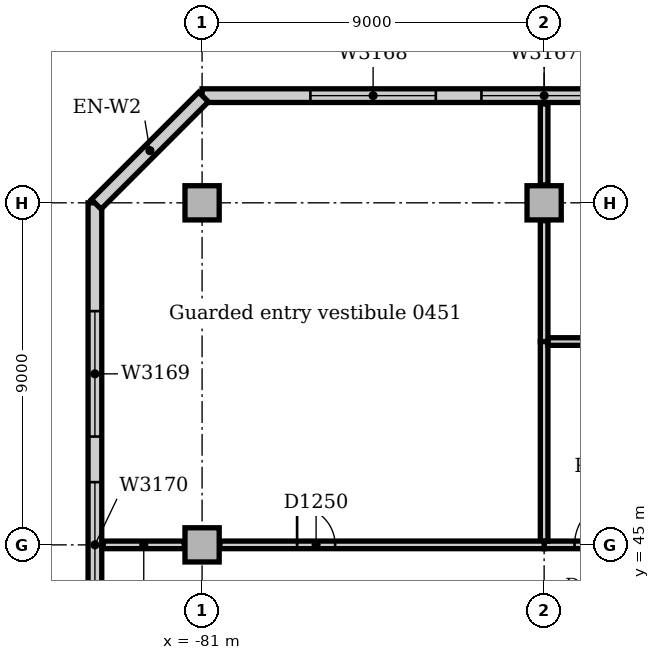
"""IFC4 building model, lengths in metres.
Left out: names, types, materials, properties, quantities, classifications, styles, units other than length and angle.
Written with IfcOpenShell. Run it as: python <this file> out.ifc"""

import sys

from ifc_helpers import new_model, si_unit, direction, frame, frame_2d, origin, origin_2d, place, context, subcontext, project, spatial, rectangle, extrude, element, fill, save


model = new_model("IFC4")
c1 = context("Model", 3, precision=1e-05, world=origin(), true_north=direction((0.0, 1.0)))
c2 = subcontext(c1, "Body", "Model", "MODEL_VIEW")
j1 = project(units=[si_unit("LENGTHUNIT", "METRE"), si_unit("PLANEANGLEUNIT", "RADIAN")], contexts=[c1])
p1 = place(None, origin())
s1 = spatial("IfcSite", under=j1, at=p1, CompositionType="ELEMENT")
p2 = place(p1, origin())
s2 = spatial("IfcBuilding", under=s1, at=p2, CompositionType="ELEMENT")
p3 = place(p2, frame((0.0, 0.0, 21.0)))
s3 = spatial("IfcBuildingStorey", under=s2, at=p3, CompositionType="ELEMENT", Elevation=21.0)
for number, where, z_axis, x_axis in (
    (1, (-81.0, 45.0, 0.0), (0.0, 0.0, 1.0), (1.0, 0.0, 0.0)),
    (2, (-81.0, 54.0, 0.0), (0.0, 0.0, 1.0), (1.0, 0.0, 0.0)),
    (3, (-72.0, 54.0, 0.0), (0.0, 0.0, 1.0), (1.0, 0.0, 0.0)),
):
    element("IfcColumn", number, at=place(p3, frame(where, z_axis=z_axis, x_axis=x_axis)), inside=s3, PredefinedType="COLUMN", context=c2, shape_type="SweptSolid", body=[
        extrude(rectangle(XDim=0.9, YDim=0.9, at=origin_2d()), origin(), (0.0, 0.0, 1.0), 4.7),
    ])
p4 = place(p3, frame((63.0, 56.82, 0.0), z_axis=(0.0, 0.0, 1.0), x_axis=(-1.0, 0.0, 0.0)))
e4 = element("IfcWall", 4, at=p4, inside=s3, PredefinedType="STANDARD", context=c2, shape_type="SweptSolid", body=[
    extrude(rectangle(XDim=144.0, YDim=0.36, at=frame_2d((72.0, 0.0))), origin(), (0.0, 0.0, 1.0), 4.85),
])
p5 = place(p4, frame((2.85, 0.0, 0.9)))
e5 = element("IfcOpeningElement", 5, at=p5, cuts=e4, PredefinedType="OPENING", context=c2, shape_type="SweptSolid", body=[
    extrude(rectangle(XDim=3.3, YDim=2.4, at=frame_2d((1.65, 1.2))), frame((0.0, 0.19, 0.0), z_axis=(0.0, -1.0, 0.0), x_axis=(1.0, 0.0, 0.0)), (0.0, 0.0, 1.0), 0.38),
])
p6 = place(p4, frame((7.35, 0.0, 0.9)))
e6 = element("IfcOpeningElement", 6, at=p6, cuts=e4, PredefinedType="OPENING", context=c2, shape_type="SweptSolid", body=[
    extrude(rectangle(XDim=3.3, YDim=2.4, at=frame_2d((1.65, 1.2))), frame((0.0, 0.19, 0.0), z_axis=(0.0, -1.0, 0.0), x_axis=(1.0, 0.0, 0.0)), (0.0, 0.0, 1.0), 0.38),
])
p7 = place(p4, frame((11.85, 0.0, 0.9)))
e7 = element("IfcOpeningElement", 7, at=p7, cuts=e4, PredefinedType="OPENING", context=c2, shape_type="SweptSolid", body=[
    extrude(rectangle(XDim=3.3, YDim=2.4, at=frame_2d((1.65, 1.2))), frame((0.0, 0.19, 0.0), z_axis=(0.0, -1.0, 0.0), x_axis=(1.0, 0.0, 0.0)), (0.0, 0.0, 1.0), 0.38),
])
p8 = place(p4, frame((16.35, 0.0, 0.9)))
e8 = element("IfcOpeningElement", 8, at=p8, cuts=e4, PredefinedType="OPENING", context=c2, shape_type="SweptSolid", body=[
    extrude(rectangle(XDim=3.3, YDim=2.4, at=frame_2d((1.65, 1.2))), frame((0.0, 0.19, 0.0), z_axis=(0.0, -1.0, 0.0), x_axis=(1.0, 0.0, 0.0)), (0.0, 0.0, 1.0), 0.38),
])
p9 = place(p4, frame((20.85, 0.0, 0.9)))
e9 = element("IfcOpeningElement", 9, at=p9, cuts=e4, PredefinedType="OPENING", context=c2, shape_type="SweptSolid", body=[
    extrude(rectangle(XDim=3.3, YDim=2.4, at=frame_2d((1.65, 1.2))), frame((0.0, 0.19, 0.0), z_axis=(0.0, -1.0, 0.0), x_axis=(1.0, 0.0, 0.0)), (0.0, 0.0, 1.0), 0.38),
])
p10 = place(p4, frame((25.35, 0.0, 0.9)))
e10 = element("IfcOpeningElement", 10, at=p10, cuts=e4, PredefinedType="OPENING", context=c2, shape_type="SweptSolid", body=[
    extrude(rectangle(XDim=3.3, YDim=2.4, at=frame_2d((1.65, 1.2))), frame((0.0, 0.19, 0.0), z_axis=(0.0, -1.0, 0.0), x_axis=(1.0, 0.0, 0.0)), (0.0, 0.0, 1.0), 0.38),
])
p11 = place(p4, frame((29.85, 0.0, 0.9)))
e11 = element("IfcOpeningElement", 11, at=p11, cuts=e4, PredefinedType="OPENING", context=c2, shape_type="SweptSolid", body=[
    extrude(rectangle(XDim=3.3, YDim=2.4, at=frame_2d((1.65, 1.2))), frame((0.0, 0.19, 0.0), z_axis=(0.0, -1.0, 0.0), x_axis=(1.0, 0.0, 0.0)), (0.0, 0.0, 1.0), 0.38),
])
p12 = place(p4, frame((34.35, 0.0, 0.9)))
e12 = element("IfcOpeningElement", 12, at=p12, cuts=e4, PredefinedType="OPENING", context=c2, shape_type="SweptSolid", body=[
    extrude(rectangle(XDim=3.3, YDim=2.4, at=frame_2d((1.65, 1.2))), frame((0.0, 0.19, 0.0), z_axis=(0.0, -1.0, 0.0), x_axis=(1.0, 0.0, 0.0)), (0.0, 0.0, 1.0), 0.38),
])
p13 = place(p4, frame((38.85, 0.0, 0.9)))
e13 = element("IfcOpeningElement", 13, at=p13, cuts=e4, PredefinedType="OPENING", context=c2, shape_type="SweptSolid", body=[
    extrude(rectangle(XDim=3.3, YDim=2.4, at=frame_2d((1.65, 1.2))), frame((0.0, 0.19, 0.0), z_axis=(0.0, -1.0, 0.0), x_axis=(1.0, 0.0, 0.0)), (0.0, 0.0, 1.0), 0.38),
])
p14 = place(p4, frame((43.35, 0.0, 0.9)))
e14 = element("IfcOpeningElement", 14, at=p14, cuts=e4, PredefinedType="OPENING", context=c2, shape_type="SweptSolid", body=[
    extrude(rectangle(XDim=3.3, YDim=2.4, at=frame_2d((1.65, 1.2))), frame((0.0, 0.19, 0.0), z_axis=(0.0, -1.0, 0.0), x_axis=(1.0, 0.0, 0.0)), (0.0, 0.0, 1.0), 0.38),
])
p15 = place(p4, frame((47.85, 0.0, 0.9)))
e15 = element("IfcOpeningElement", 15, at=p15, cuts=e4, PredefinedType="OPENING", context=c2, shape_type="SweptSolid", body=[
    extrude(rectangle(XDim=3.3, YDim=2.4, at=frame_2d((1.65, 1.2))), frame((0.0, 0.19, 0.0), z_axis=(0.0, -1.0, 0.0), x_axis=(1.0, 0.0, 0.0)), (0.0, 0.0, 1.0), 0.38),
])
p16 = place(p4, frame((52.35, 0.0, 0.9)))
e16 = element("IfcOpeningElement", 16, at=p16, cuts=e4, PredefinedType="OPENING", context=c2, shape_type="SweptSolid", body=[
    extrude(rectangle(XDim=3.3, YDim=2.4, at=frame_2d((1.65, 1.2))), frame((0.0, 0.19, 0.0), z_axis=(0.0, -1.0, 0.0), x_axis=(1.0, 0.0, 0.0)), (0.0, 0.0, 1.0), 0.38),
])
p17 = place(p4, frame((56.85, 0.0, 0.9)))
e17 = element("IfcOpeningElement", 17, at=p17, cuts=e4, PredefinedType="OPENING", context=c2, shape_type="SweptSolid", body=[
    extrude(rectangle(XDim=3.3, YDim=2.4, at=frame_2d((1.65, 1.2))), frame((0.0, 0.19, 0.0), z_axis=(0.0, -1.0, 0.0), x_axis=(1.0, 0.0, 0.0)), (0.0, 0.0, 1.0), 0.38),
])
p18 = place(p4, frame((61.35, 0.0, 0.9)))
e18 = element("IfcOpeningElement", 18, at=p18, cuts=e4, PredefinedType="OPENING", context=c2, shape_type="SweptSolid", body=[
    extrude(rectangle(XDim=3.3, YDim=2.4, at=frame_2d((1.65, 1.2))), frame((0.0, 0.19, 0.0), z_axis=(0.0, -1.0, 0.0), x_axis=(1.0, 0.0, 0.0)), (0.0, 0.0, 1.0), 0.38),
])
p19 = place(p4, frame((65.85, 0.0, 0.9)))
e19 = element("IfcOpeningElement", 19, at=p19, cuts=e4, PredefinedType="OPENING", context=c2, shape_type="SweptSolid", body=[
    extrude(rectangle(XDim=3.3, YDim=2.4, at=frame_2d((1.65, 1.2))), frame((0.0, 0.19, 0.0), z_axis=(0.0, -1.0, 0.0), x_axis=(1.0, 0.0, 0.0)), (0.0, 0.0, 1.0), 0.38),
])
p20 = place(p4, frame((70.35, 0.0, 0.9)))
e20 = element("IfcOpeningElement", 20, at=p20, cuts=e4, PredefinedType="OPENING", context=c2, shape_type="SweptSolid", body=[
    extrude(rectangle(XDim=3.3, YDim=2.4, at=frame_2d((1.65, 1.2))), frame((0.0, 0.19, 0.0), z_axis=(0.0, -1.0, 0.0), x_axis=(1.0, 0.0, 0.0)), (0.0, 0.0, 1.0), 0.38),
])
p21 = place(p4, frame((74.85, 0.0, 0.9)))
e21 = element("IfcOpeningElement", 21, at=p21, cuts=e4, PredefinedType="OPENING", context=c2, shape_type="SweptSolid", body=[
    extrude(rectangle(XDim=3.3, YDim=2.4, at=frame_2d((1.65, 1.2))), frame((0.0, 0.19, 0.0), z_axis=(0.0, -1.0, 0.0), x_axis=(1.0, 0.0, 0.0)), (0.0, 0.0, 1.0), 0.38),
])
p22 = place(p4, frame((79.35, 0.0, 0.9)))
e22 = element("IfcOpeningElement", 22, at=p22, cuts=e4, PredefinedType="OPENING", context=c2, shape_type="SweptSolid", body=[
    extrude(rectangle(XDim=3.3, YDim=2.4, at=frame_2d((1.65, 1.2))), frame((0.0, 0.19, 0.0), z_axis=(0.0, -1.0, 0.0), x_axis=(1.0, 0.0, 0.0)), (0.0, 0.0, 1.0), 0.38),
])
p23 = place(p4, frame((83.85, 0.0, 0.9)))
e23 = element("IfcOpeningElement", 23, at=p23, cuts=e4, PredefinedType="OPENING", context=c2, shape_type="SweptSolid", body=[
    extrude(rectangle(XDim=3.3, YDim=2.4, at=frame_2d((1.65, 1.2))), frame((0.0, 0.19, 0.0), z_axis=(0.0, -1.0, 0.0), x_axis=(1.0, 0.0, 0.0)), (0.0, 0.0, 1.0), 0.38),
])
p24 = place(p4, frame((88.35, 0.0, 0.9)))
e24 = element("IfcOpeningElement", 24, at=p24, cuts=e4, PredefinedType="OPENING", context=c2, shape_type="SweptSolid", body=[
    extrude(rectangle(XDim=3.3, YDim=2.4, at=frame_2d((1.65, 1.2))), frame((0.0, 0.19, 0.0), z_axis=(0.0, -1.0, 0.0), x_axis=(1.0, 0.0, 0.0)), (0.0, 0.0, 1.0), 0.38),
])
p25 = place(p4, frame((92.85, 0.0, 0.9)))
e25 = element("IfcOpeningElement", 25, at=p25, cuts=e4, PredefinedType="OPENING", context=c2, shape_type="SweptSolid", body=[
    extrude(rectangle(XDim=3.3, YDim=2.4, at=frame_2d((1.65, 1.2))), frame((0.0, 0.19, 0.0), z_axis=(0.0, -1.0, 0.0), x_axis=(1.0, 0.0, 0.0)), (0.0, 0.0, 1.0), 0.38),
])
p26 = place(p4, frame((97.35, 0.0, 0.9)))
e26 = element("IfcOpeningElement", 26, at=p26, cuts=e4, PredefinedType="OPENING", context=c2, shape_type="SweptSolid", body=[
    extrude(rectangle(XDim=3.3, YDim=2.4, at=frame_2d((1.65, 1.2))), frame((0.0, 0.19, 0.0), z_axis=(0.0, -1.0, 0.0), x_axis=(1.0, 0.0, 0.0)), (0.0, 0.0, 1.0), 0.38),
])
p27 = place(p4, frame((101.85, 0.0, 0.9)))
e27 = element("IfcOpeningElement", 27, at=p27, cuts=e4, PredefinedType="OPENING", context=c2, shape_type="SweptSolid", body=[
    extrude(rectangle(XDim=3.3, YDim=2.4, at=frame_2d((1.65, 1.2))), frame((0.0, 0.19, 0.0), z_axis=(0.0, -1.0, 0.0), x_axis=(1.0, 0.0, 0.0)), (0.0, 0.0, 1.0), 0.38),
])
p28 = place(p4, frame((106.35, 0.0, 0.9)))
e28 = element("IfcOpeningElement", 28, at=p28, cuts=e4, PredefinedType="OPENING", context=c2, shape_type="SweptSolid", body=[
    extrude(rectangle(XDim=3.3, YDim=2.4, at=frame_2d((1.65, 1.2))), frame((0.0, 0.19, 0.0), z_axis=(0.0, -1.0, 0.0), x_axis=(1.0, 0.0, 0.0)), (0.0, 0.0, 1.0), 0.38),
])
p29 = place(p4, frame((110.85, 0.0, 0.9)))
e29 = element("IfcOpeningElement", 29, at=p29, cuts=e4, PredefinedType="OPENING", context=c2, shape_type="SweptSolid", body=[
    extrude(rectangle(XDim=3.3, YDim=2.4, at=frame_2d((1.65, 1.2))), frame((0.0, 0.19, 0.0), z_axis=(0.0, -1.0, 0.0), x_axis=(1.0, 0.0, 0.0)), (0.0, 0.0, 1.0), 0.38),
])
p30 = place(p4, frame((115.35, 0.0, 0.9)))
e30 = element("IfcOpeningElement", 30, at=p30, cuts=e4, PredefinedType="OPENING", context=c2, shape_type="SweptSolid", body=[
    extrude(rectangle(XDim=3.3, YDim=2.4, at=frame_2d((1.65, 1.2))), frame((0.0, 0.19, 0.0), z_axis=(0.0, -1.0, 0.0), x_axis=(1.0, 0.0, 0.0)), (0.0, 0.0, 1.0), 0.38),
])
p31 = place(p4, frame((119.85, 0.0, 0.9)))
e31 = element("IfcOpeningElement", 31, at=p31, cuts=e4, PredefinedType="OPENING", context=c2, shape_type="SweptSolid", body=[
    extrude(rectangle(XDim=3.3, YDim=2.4, at=frame_2d((1.65, 1.2))), frame((0.0, 0.19, 0.0), z_axis=(0.0, -1.0, 0.0), x_axis=(1.0, 0.0, 0.0)), (0.0, 0.0, 1.0), 0.38),
])
p32 = place(p4, frame((124.35, 0.0, 0.9)))
e32 = element("IfcOpeningElement", 32, at=p32, cuts=e4, PredefinedType="OPENING", context=c2, shape_type="SweptSolid", body=[
    extrude(rectangle(XDim=3.3, YDim=2.4, at=frame_2d((1.65, 1.2))), frame((0.0, 0.19, 0.0), z_axis=(0.0, -1.0, 0.0), x_axis=(1.0, 0.0, 0.0)), (0.0, 0.0, 1.0), 0.38),
])
p33 = place(p4, frame((128.85, 0.0, 0.9)))
e33 = element("IfcOpeningElement", 33, at=p33, cuts=e4, PredefinedType="OPENING", context=c2, shape_type="SweptSolid", body=[
    extrude(rectangle(XDim=3.3, YDim=2.4, at=frame_2d((1.65, 1.2))), frame((0.0, 0.19, 0.0), z_axis=(0.0, -1.0, 0.0), x_axis=(1.0, 0.0, 0.0)), (0.0, 0.0, 1.0), 0.38),
])
p34 = place(p4, frame((133.35, 0.0, 0.9)))
e34 = element("IfcOpeningElement", 34, at=p34, cuts=e4, PredefinedType="OPENING", context=c2, shape_type="SweptSolid", body=[
    extrude(rectangle(XDim=3.3, YDim=2.4, at=frame_2d((1.65, 1.2))), frame((0.0, 0.19, 0.0), z_axis=(0.0, -1.0, 0.0), x_axis=(1.0, 0.0, 0.0)), (0.0, 0.0, 1.0), 0.38),
])
p35 = place(p4, frame((137.85, 0.0, 0.9)))
e35 = element("IfcOpeningElement", 35, at=p35, cuts=e4, PredefinedType="OPENING", context=c2, shape_type="SweptSolid", body=[
    extrude(rectangle(XDim=3.3, YDim=2.4, at=frame_2d((1.65, 1.2))), frame((0.0, 0.19, 0.0), z_axis=(0.0, -1.0, 0.0), x_axis=(1.0, 0.0, 0.0)), (0.0, 0.0, 1.0), 0.38),
])
p36 = place(p3, frame((-83.82, 54.0, 0.0), z_axis=(0.0, 0.0, 1.0), x_axis=(0.0, -1.0, 0.0)))
e36 = element("IfcWall", 36, at=p36, inside=s3, PredefinedType="STANDARD", context=c2, shape_type="SweptSolid", body=[
    extrude(rectangle(XDim=63.0, YDim=0.36, at=frame_2d((31.5, 0.0))), origin(), (0.0, 0.0, 1.0), 4.85),
])
p37 = place(p36, frame((2.85, 0.0, 0.9)))
e37 = element("IfcOpeningElement", 37, at=p37, cuts=e36, PredefinedType="OPENING", context=c2, shape_type="SweptSolid", body=[
    extrude(rectangle(XDim=3.3, YDim=2.4, at=frame_2d((1.65, 1.2))), frame((0.0, 0.19, 0.0), z_axis=(0.0, -1.0, 0.0), x_axis=(1.0, 0.0, 0.0)), (0.0, 0.0, 1.0), 0.38),
])
p38 = place(p36, frame((7.35, 0.0, 0.9)))
e38 = element("IfcOpeningElement", 38, at=p38, cuts=e36, PredefinedType="OPENING", context=c2, shape_type="SweptSolid", body=[
    extrude(rectangle(XDim=3.3, YDim=2.4, at=frame_2d((1.65, 1.2))), frame((0.0, 0.19, 0.0), z_axis=(0.0, -1.0, 0.0), x_axis=(1.0, 0.0, 0.0)), (0.0, 0.0, 1.0), 0.38),
])
p39 = place(p36, frame((11.85, 0.0, 0.9)))
e39 = element("IfcOpeningElement", 39, at=p39, cuts=e36, PredefinedType="OPENING", context=c2, shape_type="SweptSolid", body=[
    extrude(rectangle(XDim=3.3, YDim=2.4, at=frame_2d((1.65, 1.2))), frame((0.0, 0.19, 0.0), z_axis=(0.0, -1.0, 0.0), x_axis=(1.0, 0.0, 0.0)), (0.0, 0.0, 1.0), 0.38),
])
p40 = place(p36, frame((16.35, 0.0, 0.9)))
e40 = element("IfcOpeningElement", 40, at=p40, cuts=e36, PredefinedType="OPENING", context=c2, shape_type="SweptSolid", body=[
    extrude(rectangle(XDim=3.3, YDim=2.4, at=frame_2d((1.65, 1.2))), frame((0.0, 0.19, 0.0), z_axis=(0.0, -1.0, 0.0), x_axis=(1.0, 0.0, 0.0)), (0.0, 0.0, 1.0), 0.38),
])
p41 = place(p36, frame((20.85, 0.0, 0.9)))
e41 = element("IfcOpeningElement", 41, at=p41, cuts=e36, PredefinedType="OPENING", context=c2, shape_type="SweptSolid", body=[
    extrude(rectangle(XDim=3.3, YDim=2.4, at=frame_2d((1.65, 1.2))), frame((0.0, 0.19, 0.0), z_axis=(0.0, -1.0, 0.0), x_axis=(1.0, 0.0, 0.0)), (0.0, 0.0, 1.0), 0.38),
])
p42 = place(p36, frame((25.35, 0.0, 0.9)))
e42 = element("IfcOpeningElement", 42, at=p42, cuts=e36, PredefinedType="OPENING", context=c2, shape_type="SweptSolid", body=[
    extrude(rectangle(XDim=3.3, YDim=2.4, at=frame_2d((1.65, 1.2))), frame((0.0, 0.19, 0.0), z_axis=(0.0, -1.0, 0.0), x_axis=(1.0, 0.0, 0.0)), (0.0, 0.0, 1.0), 0.38),
])
p43 = place(p36, frame((29.85, 0.0, 0.9)))
e43 = element("IfcOpeningElement", 43, at=p43, cuts=e36, PredefinedType="OPENING", context=c2, shape_type="SweptSolid", body=[
    extrude(rectangle(XDim=3.3, YDim=2.4, at=frame_2d((1.65, 1.2))), frame((0.0, 0.19, 0.0), z_axis=(0.0, -1.0, 0.0), x_axis=(1.0, 0.0, 0.0)), (0.0, 0.0, 1.0), 0.38),
])
p44 = place(p36, frame((34.35, 0.0, 0.9)))
e44 = element("IfcOpeningElement", 44, at=p44, cuts=e36, PredefinedType="OPENING", context=c2, shape_type="SweptSolid", body=[
    extrude(rectangle(XDim=3.3, YDim=2.4, at=frame_2d((1.65, 1.2))), frame((0.0, 0.19, 0.0), z_axis=(0.0, -1.0, 0.0), x_axis=(1.0, 0.0, 0.0)), (0.0, 0.0, 1.0), 0.38),
])
p45 = place(p36, frame((38.85, 0.0, 0.9)))
e45 = element("IfcOpeningElement", 45, at=p45, cuts=e36, PredefinedType="OPENING", context=c2, shape_type="SweptSolid", body=[
    extrude(rectangle(XDim=3.3, YDim=2.4, at=frame_2d((1.65, 1.2))), frame((0.0, 0.19, 0.0), z_axis=(0.0, -1.0, 0.0), x_axis=(1.0, 0.0, 0.0)), (0.0, 0.0, 1.0), 0.38),
])
p46 = place(p36, frame((43.35, 0.0, 0.9)))
e46 = element("IfcOpeningElement", 46, at=p46, cuts=e36, PredefinedType="OPENING", context=c2, shape_type="SweptSolid", body=[
    extrude(rectangle(XDim=3.3, YDim=2.4, at=frame_2d((1.65, 1.2))), frame((0.0, 0.19, 0.0), z_axis=(0.0, -1.0, 0.0), x_axis=(1.0, 0.0, 0.0)), (0.0, 0.0, 1.0), 0.38),
])
p47 = place(p36, frame((47.85, 0.0, 0.9)))
e47 = element("IfcOpeningElement", 47, at=p47, cuts=e36, PredefinedType="OPENING", context=c2, shape_type="SweptSolid", body=[
    extrude(rectangle(XDim=3.3, YDim=2.4, at=frame_2d((1.65, 1.2))), frame((0.0, 0.19, 0.0), z_axis=(0.0, -1.0, 0.0), x_axis=(1.0, 0.0, 0.0)), (0.0, 0.0, 1.0), 0.38),
])
p48 = place(p36, frame((52.35, 0.0, 0.9)))
e48 = element("IfcOpeningElement", 48, at=p48, cuts=e36, PredefinedType="OPENING", context=c2, shape_type="SweptSolid", body=[
    extrude(rectangle(XDim=3.3, YDim=2.4, at=frame_2d((1.65, 1.2))), frame((0.0, 0.19, 0.0), z_axis=(0.0, -1.0, 0.0), x_axis=(1.0, 0.0, 0.0)), (0.0, 0.0, 1.0), 0.38),
])
p49 = place(p36, frame((56.85, 0.0, 0.9)))
e49 = element("IfcOpeningElement", 49, at=p49, cuts=e36, PredefinedType="OPENING", context=c2, shape_type="SweptSolid", body=[
    extrude(rectangle(XDim=3.3, YDim=2.4, at=frame_2d((1.65, 1.2))), frame((0.0, 0.19, 0.0), z_axis=(0.0, -1.0, 0.0), x_axis=(1.0, 0.0, 0.0)), (0.0, 0.0, 1.0), 0.38),
])
p50 = place(p3, frame((-80.961, 56.784, 0.0), z_axis=(0.0, 0.0, 1.0), x_axis=(-0.707106781187, -0.707106781187, 0.0)))
e50 = element("IfcWall", 50, at=p50, inside=s3, PredefinedType="STANDARD", context=c2, shape_type="SweptSolid", body=[
    extrude(rectangle(XDim=3.993, YDim=0.36, at=frame_2d((1.996, 0.0))), origin(), (0.0, 0.0, 1.0), 4.85),
])
p51 = place(p3, frame((-72.0, 45.0, 0.0), z_axis=(0.0, 0.0, 1.0), x_axis=(1.0, 0.0, 0.0)))
e51 = element("IfcWall", 51, at=p51, inside=s3, PredefinedType="SOLIDWALL", context=c2, shape_type="SweptSolid", body=[
    extrude(rectangle(XDim=9.0, YDim=0.2, at=frame_2d((4.5, 0.0))), origin(), (0.0, 0.0, 1.0), 4.7),
])
p52 = place(p51, frame((0.8, 0.0, 0.0)))
e52 = element("IfcOpeningElement", 52, at=p52, cuts=e51, PredefinedType="OPENING", context=c2, shape_type="SweptSolid", body=[
    extrude(rectangle(XDim=1.2, YDim=2.1, at=frame_2d((0.6, 1.05))), frame((0.0, 0.11, 0.0), z_axis=(0.0, -1.0, 0.0), x_axis=(1.0, 0.0, 0.0)), (0.0, 0.0, 1.0), 0.22),
])
p53 = place(p3, frame((-72.0, 45.1, 0.0), z_axis=(0.0, 0.0, 1.0), x_axis=(0.0, 1.0, 0.0)))
e53 = element("IfcWall", 53, at=p53, inside=s3, PredefinedType="SOLIDWALL", context=c2, shape_type="SweptSolid", body=[
    extrude(rectangle(XDim=5.25, YDim=0.2, at=frame_2d((2.625, 0.0))), origin(), (0.0, 0.0, 1.0), 4.7),
])
p54 = place(p3, frame((-71.9, 50.35, 0.0), z_axis=(0.0, 0.0, 1.0), x_axis=(1.0, 0.0, 0.0)))
e54 = element("IfcWall", 54, at=p54, inside=s3, PredefinedType="SOLIDWALL", context=c2, shape_type="SweptSolid", body=[
    extrude(rectangle(XDim=9.0, YDim=0.2, at=frame_2d((4.5, 0.0))), origin(), (0.0, 0.0, 1.0), 4.7),
])
p55 = place(p3, frame((-83.6, 45.0, 0.0), z_axis=(0.0, 0.0, 1.0), x_axis=(1.0, 0.0, 0.0)))
e55 = element("IfcWall", 55, at=p55, inside=s3, PredefinedType="PARTITIONING", context=c2, shape_type="SweptSolid", body=[
    extrude(rectangle(XDim=2.13, YDim=0.2, at=frame_2d((1.065, 0.0))), origin(), (0.0, 0.0, 1.0), 4.7),
])
p56 = place(p3, frame((-80.53, 45.0, 0.0), z_axis=(0.0, 0.0, 1.0), x_axis=(1.0, 0.0, 0.0)))
e56 = element("IfcWall", 56, at=p56, inside=s3, PredefinedType="PARTITIONING", context=c2, shape_type="SweptSolid", body=[
    extrude(rectangle(XDim=8.53, YDim=0.2, at=frame_2d((4.265, 0.0))), origin(), (0.0, 0.0, 1.0), 4.7),
])
p57 = place(p56, frame((2.03, 0.0, 0.0)))
e57 = element("IfcOpeningElement", 57, at=p57, cuts=e56, PredefinedType="OPENING", context=c2, shape_type="SweptSolid", body=[
    extrude(rectangle(XDim=1.0, YDim=2.1, at=frame_2d((0.5, 1.05))), frame((0.0, 0.11, 0.0), z_axis=(0.0, -1.0, 0.0), x_axis=(1.0, 0.0, 0.0)), (0.0, 0.0, 1.0), 0.22),
])
p58 = place(p3, frame((-72.0, 50.35, 0.0), z_axis=(0.0, 0.0, 1.0), x_axis=(0.0, 1.0, 0.0)))
e58 = element("IfcWall", 58, at=p58, inside=s3, PredefinedType="PARTITIONING", context=c2, shape_type="SweptSolid", body=[
    extrude(rectangle(XDim=3.18, YDim=0.2, at=frame_2d((1.59, 0.0))), origin(), (0.0, 0.0, 1.0), 4.7),
])
p59 = place(p3, frame((-72.0, 54.47, 0.0), z_axis=(0.0, 0.0, 1.0), x_axis=(0.0, 1.0, 0.0)))
e59 = element("IfcWall", 59, at=p59, inside=s3, PredefinedType="PARTITIONING", context=c2, shape_type="SweptSolid", body=[
    extrude(rectangle(XDim=2.13, YDim=0.2, at=frame_2d((1.065, 0.0))), origin(), (0.0, 0.0, 1.0), 4.7),
])
p60 = place(p34, origin())
e60 = element("IfcWindow", 60, at=p60, inside=s3, PartitioningType="SINGLE_PANEL", PredefinedType="WINDOW", context=c2, shape_type="SweptSolid", body=[
    extrude(rectangle(XDim=3.3, YDim=2.4, at=frame_2d((1.65, 1.2))), frame((0.0, 0.13, 0.0), z_axis=(0.0, -1.0, 0.0), x_axis=(1.0, 0.0, 0.0)), (0.0, 0.0, 1.0), 0.06),
])
fill(e34, e60)
p61 = place(p35, origin())
e61 = element("IfcWindow", 61, at=p61, inside=s3, PartitioningType="SINGLE_PANEL", PredefinedType="WINDOW", context=c2, shape_type="SweptSolid", body=[
    extrude(rectangle(XDim=3.3, YDim=2.4, at=frame_2d((1.65, 1.2))), frame((0.0, 0.13, 0.0), z_axis=(0.0, -1.0, 0.0), x_axis=(1.0, 0.0, 0.0)), (0.0, 0.0, 1.0), 0.06),
])
fill(e35, e61)
p62 = place(p37, origin())
e62 = element("IfcWindow", 62, at=p62, inside=s3, PartitioningType="SINGLE_PANEL", PredefinedType="WINDOW", context=c2, shape_type="SweptSolid", body=[
    extrude(rectangle(XDim=3.3, YDim=2.4, at=frame_2d((1.65, 1.2))), frame((0.0, 0.13, 0.0), z_axis=(0.0, -1.0, 0.0), x_axis=(1.0, 0.0, 0.0)), (0.0, 0.0, 1.0), 0.06),
])
fill(e37, e62)
p63 = place(p38, origin())
e63 = element("IfcWindow", 63, at=p63, inside=s3, PartitioningType="SINGLE_PANEL", PredefinedType="WINDOW", context=c2, shape_type="SweptSolid", body=[
    extrude(rectangle(XDim=3.3, YDim=2.4, at=frame_2d((1.65, 1.2))), frame((0.0, 0.13, 0.0), z_axis=(0.0, -1.0, 0.0), x_axis=(1.0, 0.0, 0.0)), (0.0, 0.0, 1.0), 0.06),
])
fill(e38, e63)
p64 = place(p57, origin())
e64 = element("IfcDoor", 64, at=p64, inside=s3, OperationType="SINGLE_SWING_LEFT", PredefinedType="DOOR", context=c2, shape_type="SweptSolid", body=[
    extrude(rectangle(XDim=1.0, YDim=2.1, at=frame_2d((0.5, 1.05))), frame((0.0, 0.025, 0.0), z_axis=(0.0, -1.0, 0.0), x_axis=(1.0, 0.0, 0.0)), (0.0, 0.0, 1.0), 0.05),
])
fill(e57, e64)
p65 = place(p52, origin())
e65 = element("IfcDoor", 65, at=p65, inside=s3, OperationType="SINGLE_SWING_RIGHT", PredefinedType="DOOR", context=c2, shape_type="SweptSolid", body=[
    extrude(rectangle(XDim=1.2, YDim=2.1, at=frame_2d((0.6, 1.05))), frame((0.0, 0.025, 0.0), z_axis=(0.0, -1.0, 0.0), x_axis=(1.0, 0.0, 0.0)), (0.0, 0.0, 1.0), 0.05),
])
fill(e52, e65)
save(model, sys.argv[1])
